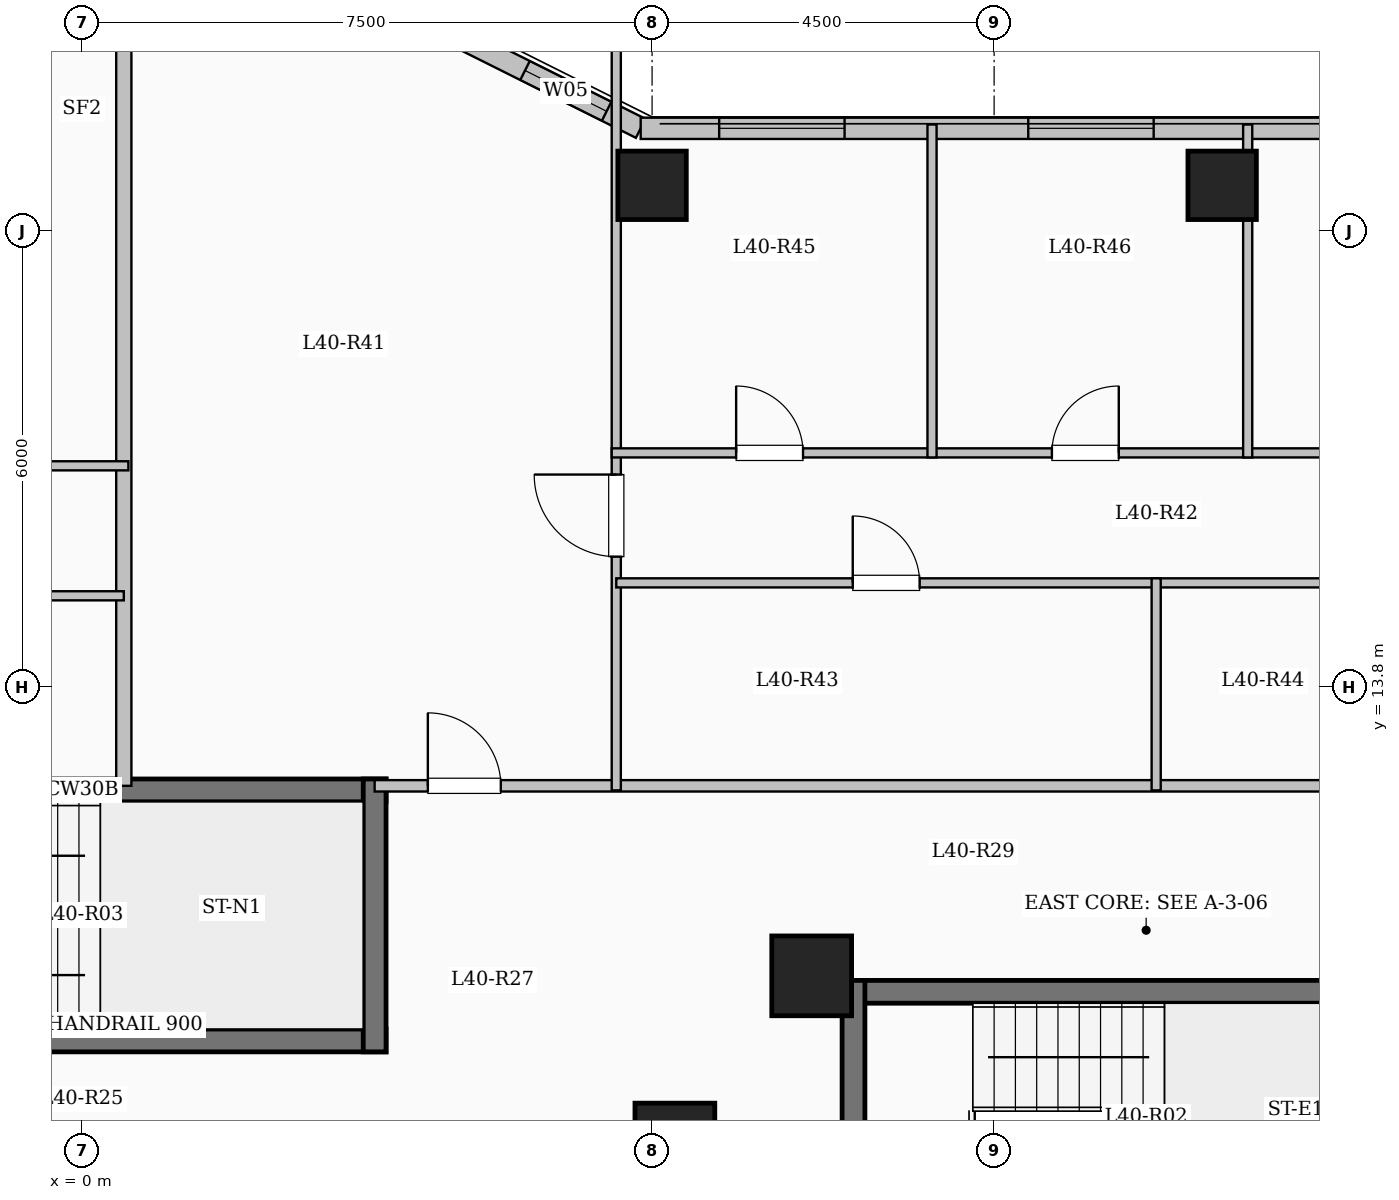
"""IFC4 building model, lengths in metres.
Left out: names, types, materials, properties, quantities, classifications, styles, units other than length and angle.
Written with IfcOpenShell. Run it as: python <this file> out.ifc"""

import sys

from ifc_helpers import new_model, si_unit, direction, frame, frame_2d, origin, origin_2d, place, context, subcontext, project, spatial, rectangle, extrude, element, fill, save


model = new_model("IFC4")
c1 = context("Model", 3, precision=1e-05, world=origin(), true_north=direction((0.0, 1.0)))
c2 = subcontext(c1, "Body", "Model", "MODEL_VIEW")
j1 = project(units=[si_unit("LENGTHUNIT", "METRE"), si_unit("PLANEANGLEUNIT", "RADIAN")], contexts=[c1])
p1 = place(None, origin())
s1 = spatial("IfcSite", under=j1, at=p1, CompositionType="ELEMENT")
p2 = place(p1, origin())
s2 = spatial("IfcBuilding", under=s1, at=p2, CompositionType="ELEMENT")
p3 = place(p2, frame((0.0, 0.0, 149.35)))
s3 = spatial("IfcBuildingStorey", under=s2, at=p3, CompositionType="ELEMENT", Elevation=149.35)
for number, where, z_axis, x_axis in (
    (1, (7.8, 7.8, 0.0), (0.0, 0.0, 1.0), (1.0, 0.0, 0.0)),
    (2, (9.6, 10.0, 0.0), (0.0, 0.0, 1.0), (1.0, 0.0, 0.0)),
):
    element("IfcColumn", number, at=place(p3, frame(where, z_axis=z_axis, x_axis=x_axis)), inside=s3, PredefinedType="COLUMN", context=c2, shape_type="SweptSolid", body=[
        extrude(rectangle(XDim=1.05, YDim=1.05, at=origin_2d()), origin(), (0.0, 0.0, 1.0), 3.35),
    ])
for number, where, z_axis, x_axis in (
    (3, (7.5, 20.4, 0.0), (0.0, 0.0, 1.0), (1.0, 0.0, 0.0)),
    (4, (15.0, 20.4, 0.0), (0.0, 0.0, 1.0), (1.0, 0.0, 0.0)),
):
    element("IfcColumn", number, at=place(p3, frame(where, z_axis=z_axis, x_axis=x_axis)), inside=s3, PredefinedType="COLUMN", context=c2, shape_type="SweptSolid", body=[
        extrude(rectangle(XDim=0.9, YDim=0.9, at=origin_2d()), origin(), (0.0, 0.0, 1.0), 3.35),
    ])
p4 = place(p3, frame((4.35, 22.65, 0.0), z_axis=(0.0, 0.0, 1.0), x_axis=(0.894427191, -0.4472135955, 0.0)))
e5 = element("IfcWall", 5, at=p4, inside=s3, PredefinedType="SOLIDWALL", context=c2, shape_type="SweptSolid", body=[
    extrude(rectangle(XDim=3.354, YDim=0.28, at=frame_2d((1.677, 0.0))), origin(), (0.0, 0.0, 1.0), 3.1),
])
p5 = place(p4, frame((1.653, 0.0, 0.95)))
e6 = element("IfcOpeningElement", 6, at=p5, cuts=e5, PredefinedType="OPENING", context=c2, shape_type="SweptSolid", body=[
    extrude(rectangle(XDim=1.2, YDim=1.5, at=frame_2d((0.6, 0.75))), frame((0.0, 0.15, 0.0), z_axis=(0.0, -1.0, 0.0), x_axis=(1.0, 0.0, 0.0)), (0.0, 0.0, 1.0), 0.3),
])
p6 = place(p3, frame((7.35, 21.15, 0.0), z_axis=(0.0, 0.0, 1.0), x_axis=(1.0, 0.0, 0.0)))
e7 = element("IfcWall", 7, at=p6, inside=s3, PredefinedType="SOLIDWALL", context=c2, shape_type="SweptSolid", body=[
    extrude(rectangle(XDim=12.3, YDim=0.28, at=frame_2d((6.15, 0.0))), origin(), (0.0, 0.0, 1.0), 3.1),
])
p7 = place(p6, frame((1.033, 0.0, 0.9)))
e8 = element("IfcOpeningElement", 8, at=p7, cuts=e7, PredefinedType="OPENING", context=c2, shape_type="SweptSolid", body=[
    extrude(rectangle(XDim=1.65, YDim=1.6, at=frame_2d((0.825, 0.8))), frame((0.0, 0.15, 0.0), z_axis=(0.0, -1.0, 0.0), x_axis=(1.0, 0.0, 0.0)), (0.0, 0.0, 1.0), 0.3),
])
p8 = place(p6, frame((5.099, 0.0, 0.9)))
e9 = element("IfcOpeningElement", 9, at=p8, cuts=e7, PredefinedType="OPENING", context=c2, shape_type="SweptSolid", body=[
    extrude(rectangle(XDim=1.65, YDim=1.6, at=frame_2d((0.825, 0.8))), frame((0.0, 0.15, 0.0), z_axis=(0.0, -1.0, 0.0), x_axis=(1.0, 0.0, 0.0)), (0.0, 0.0, 1.0), 0.3),
])
p9 = place(p6, frame((9.291, 0.0, 0.9)))
e10 = element("IfcOpeningElement", 10, at=p9, cuts=e7, PredefinedType="OPENING", context=c2, shape_type="SweptSolid", body=[
    extrude(rectangle(XDim=1.65, YDim=1.6, at=frame_2d((0.825, 0.8))), frame((0.0, 0.15, 0.0), z_axis=(0.0, -1.0, 0.0), x_axis=(1.0, 0.0, 0.0)), (0.0, 0.0, 1.0), 0.3),
])
p10 = place(p3, frame((10.0, 9.79, 0.0), z_axis=(0.0, 0.0, 1.0), x_axis=(1.0, 0.0, 0.0)))
e11 = element("IfcWall", 11, at=p10, inside=s3, PredefinedType="SHEAR", context=c2, shape_type="SweptSolid", body=[
    extrude(rectangle(XDim=8.0, YDim=0.3, at=frame_2d((4.0, 0.0))), origin(), (0.0, 0.0, 1.0), 3.35),
])
p11 = place(p3, frame((10.15, 6.35, 0.0), z_axis=(0.0, 0.0, 1.0), x_axis=(0.0, 1.0, 0.0)))
e12 = element("IfcWall", 12, at=p11, inside=s3, PredefinedType="SHEAR", context=c2, shape_type="SweptSolid", body=[
    extrude(rectangle(XDim=3.59, YDim=0.3, at=frame_2d((1.795, 0.0))), origin(), (0.0, 0.0, 1.0), 3.35),
])
p12 = place(p3, frame((-4.0, 12.44, 0.0), z_axis=(0.0, 0.0, 1.0), x_axis=(1.0, 0.0, 0.0)))
e13 = element("IfcWall", 13, at=p12, inside=s3, PredefinedType="SHEAR", context=c2, shape_type="SweptSolid", body=[
    extrude(rectangle(XDim=8.0, YDim=0.3, at=frame_2d((4.0, 0.0))), origin(), (0.0, 0.0, 1.0), 3.35),
])
p13 = place(p3, frame((-4.0, 9.15, 0.0), z_axis=(0.0, 0.0, 1.0), x_axis=(1.0, 0.0, 0.0)))
e14 = element("IfcWall", 14, at=p13, inside=s3, PredefinedType="SHEAR", context=c2, shape_type="SweptSolid", body=[
    extrude(rectangle(XDim=8.0, YDim=0.3, at=frame_2d((4.0, 0.0))), origin(), (0.0, 0.0, 1.0), 3.35),
])
p14 = place(p13, frame((0.55, 0.0, 0.0)))
e15 = element("IfcOpeningElement", 15, at=p14, cuts=e14, PredefinedType="OPENING", context=c2, shape_type="SweptSolid", body=[
    extrude(rectangle(XDim=1.0, YDim=2.15, at=frame_2d((0.5, 1.075))), frame((0.0, 0.16, 0.0), z_axis=(0.0, -1.0, 0.0), x_axis=(1.0, 0.0, 0.0)), (0.0, 0.0, 1.0), 0.32),
])
p15 = place(p3, frame((3.85, 9.0, 0.0), z_axis=(0.0, 0.0, 1.0), x_axis=(0.0, 1.0, 0.0)))
e16 = element("IfcWall", 16, at=p15, inside=s3, PredefinedType="SHEAR", context=c2, shape_type="SweptSolid", body=[
    extrude(rectangle(XDim=3.59, YDim=0.3, at=frame_2d((1.795, 0.0))), origin(), (0.0, 0.0, 1.0), 3.35),
])
p16 = place(p3, frame((3.85, 12.5, 0.0), z_axis=(0.0, 0.0, 1.0), x_axis=(1.0, 0.0, 0.0)))
e17 = element("IfcWall", 17, at=p16, inside=s3, PredefinedType="PARTITIONING", context=c2, shape_type="SweptSolid", body=[
    extrude(rectangle(XDim=15.7, YDim=0.15, at=frame_2d((7.85, 0.0))), origin(), (0.0, 0.0, 1.0), 3.1),
])
p17 = place(p16, frame((0.7, 0.0, 0.0)))
e18 = element("IfcOpeningElement", 18, at=p17, cuts=e17, PredefinedType="OPENING", context=c2, shape_type="SweptSolid", body=[
    extrude(rectangle(XDim=0.96, YDim=2.15, at=frame_2d((0.48, 1.075))), frame((0.0, 0.085, 0.0), z_axis=(0.0, -1.0, 0.0), x_axis=(1.0, 0.0, 0.0)), (0.0, 0.0, 1.0), 0.17),
])
p18 = place(p3, frame((0.55, 12.5, 0.0), z_axis=(0.0, 0.0, 1.0), x_axis=(0.0, 1.0, 0.0)))
e19 = element("IfcWall", 19, at=p18, inside=s3, PredefinedType="SOLIDWALL", context=c2, shape_type="SweptSolid", body=[
    extrude(rectangle(XDim=10.18, YDim=0.2, at=frame_2d((5.09, 0.0))), origin(), (0.0, 0.0, 1.0), 3.1),
])
p19 = place(p3, frame((-5.708, 15.0, 0.0), z_axis=(0.0, 0.0, 1.0), x_axis=(1.0, 0.0, 0.0)))
e20 = element("IfcWall", 20, at=p19, inside=s3, PredefinedType="PARTITIONING", context=c2, shape_type="SweptSolid", body=[
    extrude(rectangle(XDim=6.258, YDim=0.12, at=frame_2d((3.129, 0.0))), origin(), (0.0, 0.0, 1.0), 3.1),
])
p20 = place(p19, frame((2.689, 0.0, 0.0)))
e21 = element("IfcOpeningElement", 21, at=p20, cuts=e20, PredefinedType="OPENING", context=c2, shape_type="SweptSolid", body=[
    extrude(rectangle(XDim=0.88, YDim=2.1, at=frame_2d((0.44, 1.05))), frame((0.0, 0.07, 0.0), z_axis=(0.0, -1.0, 0.0), x_axis=(1.0, 0.0, 0.0)), (0.0, 0.0, 1.0), 0.14),
])
p21 = place(p3, frame((-12.757, 16.71, 0.0), z_axis=(0.0, 0.0, 1.0), x_axis=(1.0, 0.0, 0.0)))
e22 = element("IfcWall", 22, at=p21, inside=s3, PredefinedType="PARTITIONING", context=c2, shape_type="SweptSolid", body=[
    extrude(rectangle(XDim=13.367, YDim=0.12, at=frame_2d((6.684, 0.0))), origin(), (0.0, 0.0, 1.0), 3.1),
])
p22 = place(p21, frame((1.758, 0.0, 0.0)))
e23 = element("IfcOpeningElement", 23, at=p22, cuts=e22, PredefinedType="OPENING", context=c2, shape_type="SweptSolid", body=[
    extrude(rectangle(XDim=0.88, YDim=2.1, at=frame_2d((0.44, 1.05))), frame((0.0, 0.07, 0.0), z_axis=(0.0, -1.0, 0.0), x_axis=(1.0, 0.0, 0.0)), (0.0, 0.0, 1.0), 0.14),
])
p23 = place(p21, frame((6.153, 0.0, 0.0)))
e24 = element("IfcOpeningElement", 24, at=p23, cuts=e22, PredefinedType="OPENING", context=c2, shape_type="SweptSolid", body=[
    extrude(rectangle(XDim=0.88, YDim=2.1, at=frame_2d((0.44, 1.05))), frame((0.0, 0.07, 0.0), z_axis=(0.0, -1.0, 0.0), x_axis=(1.0, 0.0, 0.0)), (0.0, 0.0, 1.0), 0.14),
])
p24 = place(p21, frame((10.549, 0.0, 0.0)))
e25 = element("IfcOpeningElement", 25, at=p24, cuts=e22, PredefinedType="OPENING", context=c2, shape_type="SweptSolid", body=[
    extrude(rectangle(XDim=0.88, YDim=2.1, at=frame_2d((0.44, 1.05))), frame((0.0, 0.07, 0.0), z_axis=(0.0, -1.0, 0.0), x_axis=(1.0, 0.0, 0.0)), (0.0, 0.0, 1.0), 0.14),
])
p25 = place(p3, frame((7.029, 12.44, 0.0), z_axis=(0.0, 0.0, 1.0), x_axis=(0.0, 1.0, 0.0)))
e26 = element("IfcWall", 26, at=p25, inside=s3, PredefinedType="PARTITIONING", context=c2, shape_type="SweptSolid", body=[
    extrude(rectangle(XDim=9.74, YDim=0.12, at=frame_2d((4.87, 0.0))), origin(), (0.0, 0.0, 1.0), 3.1),
])
p26 = place(p25, frame((3.075, 0.0, 0.0)))
e27 = element("IfcOpeningElement", 27, at=p26, cuts=e26, PredefinedType="OPENING", context=c2, shape_type="SweptSolid", body=[
    extrude(rectangle(XDim=1.08, YDim=2.15, at=frame_2d((0.54, 1.075))), frame((0.0, 0.07, 0.0), z_axis=(0.0, -1.0, 0.0), x_axis=(1.0, 0.0, 0.0)), (0.0, 0.0, 1.0), 0.14),
])
p27 = place(p3, frame((7.029, 15.17, 0.0), z_axis=(0.0, 0.0, 1.0), x_axis=(1.0, 0.0, 0.0)))
e28 = element("IfcWall", 28, at=p27, inside=s3, PredefinedType="PARTITIONING", context=c2, shape_type="SweptSolid", body=[
    extrude(rectangle(XDim=7.103, YDim=0.12, at=frame_2d((3.552, 0.0))), origin(), (0.0, 0.0, 1.0), 3.1),
])
p28 = place(p27, frame((3.111, 0.0, 0.0)))
e29 = element("IfcOpeningElement", 29, at=p28, cuts=e28, PredefinedType="OPENING", context=c2, shape_type="SweptSolid", body=[
    extrude(rectangle(XDim=0.88, YDim=2.1, at=frame_2d((0.44, 1.05))), frame((0.0, 0.07, 0.0), z_axis=(0.0, -1.0, 0.0), x_axis=(1.0, 0.0, 0.0)), (0.0, 0.0, 1.0), 0.14),
])
p29 = place(p3, frame((14.132, 15.17, 0.0), z_axis=(0.0, 0.0, 1.0), x_axis=(1.0, 0.0, 0.0)))
e30 = element("IfcWall", 30, at=p29, inside=s3, PredefinedType="PARTITIONING", context=c2, shape_type="SweptSolid", body=[
    extrude(rectangle(XDim=5.418, YDim=0.12, at=frame_2d((2.709, 0.0))), origin(), (0.0, 0.0, 1.0), 3.1),
])
p30 = place(p29, frame((2.269, 0.0, 0.0)))
e31 = element("IfcOpeningElement", 31, at=p30, cuts=e30, PredefinedType="OPENING", context=c2, shape_type="SweptSolid", body=[
    extrude(rectangle(XDim=0.88, YDim=2.1, at=frame_2d((0.44, 1.05))), frame((0.0, 0.07, 0.0), z_axis=(0.0, -1.0, 0.0), x_axis=(1.0, 0.0, 0.0)), (0.0, 0.0, 1.0), 0.14),
])
p31 = place(p3, frame((6.969, 16.88, 0.0), z_axis=(0.0, 0.0, 1.0), x_axis=(1.0, 0.0, 0.0)))
e32 = element("IfcWall", 32, at=p31, inside=s3, PredefinedType="PARTITIONING", context=c2, shape_type="SweptSolid", body=[
    extrude(rectangle(XDim=12.641, YDim=0.12, at=frame_2d((6.321, 0.0))), origin(), (0.0, 0.0, 1.0), 2.685),
])
p32 = place(p31, frame((1.637, 0.0, 0.0)))
e33 = element("IfcOpeningElement", 33, at=p32, cuts=e32, PredefinedType="OPENING", context=c2, shape_type="SweptSolid", body=[
    extrude(rectangle(XDim=0.88, YDim=2.1, at=frame_2d((0.44, 1.05))), frame((0.0, 0.07, 0.0), z_axis=(0.0, -1.0, 0.0), x_axis=(1.0, 0.0, 0.0)), (0.0, 0.0, 1.0), 0.14),
])
p33 = place(p31, frame((5.791, 0.0, 0.0)))
e34 = element("IfcOpeningElement", 34, at=p33, cuts=e32, PredefinedType="OPENING", context=c2, shape_type="SweptSolid", body=[
    extrude(rectangle(XDim=0.88, YDim=2.1, at=frame_2d((0.44, 1.05))), frame((0.0, 0.07, 0.0), z_axis=(0.0, -1.0, 0.0), x_axis=(1.0, 0.0, 0.0)), (0.0, 0.0, 1.0), 0.14),
])
p34 = place(p31, frame((9.944, 0.0, 0.0)))
e35 = element("IfcOpeningElement", 35, at=p34, cuts=e32, PredefinedType="OPENING", context=c2, shape_type="SweptSolid", body=[
    extrude(rectangle(XDim=0.88, YDim=2.1, at=frame_2d((0.44, 1.05))), frame((0.0, 0.07, 0.0), z_axis=(0.0, -1.0, 0.0), x_axis=(1.0, 0.0, 0.0)), (0.0, 0.0, 1.0), 0.14),
])
p35 = place(p3, frame((14.132, 12.44, 0.0), z_axis=(0.0, 0.0, 1.0), x_axis=(0.0, 1.0, 0.0)))
e36 = element("IfcWall", 36, at=p35, inside=s3, PredefinedType="PARTITIONING", context=c2, shape_type="SweptSolid", body=[
    extrude(rectangle(XDim=2.79, YDim=0.12, at=frame_2d((1.395, 0.0))), origin(), (0.0, 0.0, 1.0), 3.1),
])
for number, where, z_axis, x_axis in (
    (37, (11.183, 16.82, 0.0), (0.0, 0.0, 1.0), (0.0, 1.0, 0.0)),
    (38, (15.336, 16.82, 0.0), (0.0, 0.0, 1.0), (0.0, 1.0, 0.0)),
):
    element("IfcWall", number, at=place(p3, frame(where, z_axis=z_axis, x_axis=x_axis)), inside=s3, PredefinedType="PARTITIONING", context=c2, shape_type="SweptSolid", body=[
        extrude(rectangle(XDim=4.38, YDim=0.12, at=frame_2d((2.19, 0.0))), origin(), (0.0, 0.0, 1.0), 3.1),
    ])
p36 = place(p5, origin())
e39 = element("IfcWindow", 39, at=p36, inside=s3, PartitioningType="SINGLE_PANEL", PredefinedType="WINDOW", context=c2, shape_type="SweptSolid", body=[
    extrude(rectangle(XDim=1.2, YDim=1.5, at=frame_2d((0.6, 0.75))), frame((0.0, 0.03, 0.0), z_axis=(0.0, -1.0, 0.0), x_axis=(1.0, 0.0, 0.0)), (0.0, 0.0, 1.0), 0.06),
])
fill(e6, e39)
p37 = place(p7, origin())
e40 = element("IfcWindow", 40, at=p37, inside=s3, PartitioningType="SINGLE_PANEL", PredefinedType="WINDOW", context=c2, shape_type="SweptSolid", body=[
    extrude(rectangle(XDim=1.65, YDim=1.6, at=frame_2d((0.825, 0.8))), frame((0.0, 0.03, 0.0), z_axis=(0.0, -1.0, 0.0), x_axis=(1.0, 0.0, 0.0)), (0.0, 0.0, 1.0), 0.06),
])
fill(e8, e40)
p38 = place(p8, origin())
e41 = element("IfcWindow", 41, at=p38, inside=s3, PartitioningType="SINGLE_PANEL", PredefinedType="WINDOW", context=c2, shape_type="SweptSolid", body=[
    extrude(rectangle(XDim=1.65, YDim=1.6, at=frame_2d((0.825, 0.8))), frame((0.0, 0.03, 0.0), z_axis=(0.0, -1.0, 0.0), x_axis=(1.0, 0.0, 0.0)), (0.0, 0.0, 1.0), 0.06),
])
fill(e9, e41)
p39 = place(p17, origin())
e42 = element("IfcDoor", 42, at=p39, inside=s3, OperationType="SINGLE_SWING_LEFT", PredefinedType="DOOR", context=c2, shape_type="SweptSolid", body=[
    extrude(rectangle(XDim=0.96, YDim=2.15, at=frame_2d((0.48, 1.075))), frame((0.0, 0.025, 0.0), z_axis=(0.0, -1.0, 0.0), x_axis=(1.0, 0.0, 0.0)), (0.0, 0.0, 1.0), 0.05),
])
fill(e18, e42)
p40 = place(p26, origin())
e43 = element("IfcDoor", 43, at=p40, inside=s3, OperationType="SINGLE_SWING_RIGHT", PredefinedType="DOOR", context=c2, shape_type="SweptSolid", body=[
    extrude(rectangle(XDim=1.08, YDim=2.15, at=frame_2d((0.54, 1.075))), frame((0.0, 0.025, 0.0), z_axis=(0.0, -1.0, 0.0), x_axis=(1.0, 0.0, 0.0)), (0.0, 0.0, 1.0), 0.05),
])
fill(e27, e43)
p41 = place(p28, origin())
e44 = element("IfcDoor", 44, at=p41, inside=s3, OperationType="SINGLE_SWING_LEFT", PredefinedType="DOOR", context=c2, shape_type="SweptSolid", body=[
    extrude(rectangle(XDim=0.88, YDim=2.1, at=frame_2d((0.44, 1.05))), frame((0.0, 0.025, 0.0), z_axis=(0.0, -1.0, 0.0), x_axis=(1.0, 0.0, 0.0)), (0.0, 0.0, 1.0), 0.05),
])
fill(e29, e44)
p42 = place(p32, origin())
e45 = element("IfcDoor", 45, at=p42, inside=s3, OperationType="SINGLE_SWING_LEFT", PredefinedType="DOOR", context=c2, shape_type="SweptSolid", body=[
    extrude(rectangle(XDim=0.88, YDim=2.1, at=frame_2d((0.44, 1.05))), frame((0.0, 0.025, 0.0), z_axis=(0.0, -1.0, 0.0), x_axis=(1.0, 0.0, 0.0)), (0.0, 0.0, 1.0), 0.05),
])
fill(e33, e45)
p43 = place(p33, origin())
e46 = element("IfcDoor", 46, at=p43, inside=s3, OperationType="SINGLE_SWING_RIGHT", PredefinedType="DOOR", context=c2, shape_type="SweptSolid", body=[
    extrude(rectangle(XDim=0.88, YDim=2.1, at=frame_2d((0.44, 1.05))), frame((0.0, 0.025, 0.0), z_axis=(0.0, -1.0, 0.0), x_axis=(1.0, 0.0, 0.0)), (0.0, 0.0, 1.0), 0.05),
])
fill(e34, e46)
save(model, sys.argv[1])
